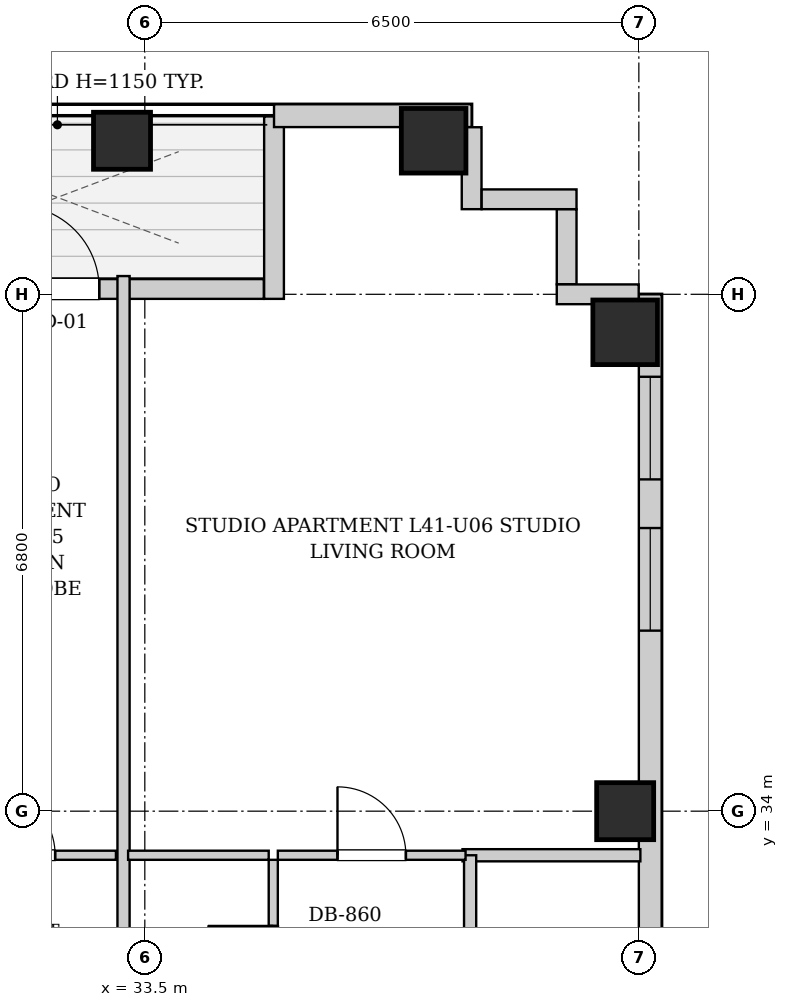
"""IFC4 building model, lengths in metres.
Left out: names, types, materials, properties, quantities, classifications, styles, units other than length and angle.
Written with IfcOpenShell. Run it as: python <this file> out.ifc"""

import sys

from ifc_helpers import new_model, si_unit, direction, frame, frame_2d, origin, origin_2d, place, context, subcontext, project, spatial, rectangle, extrude, element, fill, save


model = new_model("IFC4")
c1 = context("Model", 3, precision=1e-05, world=origin(), true_north=direction((0.0, 1.0)))
c2 = subcontext(c1, "Body", "Model", "MODEL_VIEW")
j1 = project(units=[si_unit("LENGTHUNIT", "METRE"), si_unit("PLANEANGLEUNIT", "RADIAN")], contexts=[c1])
p1 = place(None, origin())
s1 = spatial("IfcSite", under=j1, at=p1, CompositionType="ELEMENT")
p2 = place(p1, origin())
s2 = spatial("IfcBuilding", under=s1, at=p2, CompositionType="ELEMENT")
p3 = place(p2, frame((0.0, 0.0, 143.9)))
s3 = spatial("IfcBuildingStorey", under=s2, at=p3, CompositionType="ELEMENT", Elevation=143.9)
p4 = place(p3, frame((33.2, 42.82, 0.0), z_axis=(0.0, 0.0, 1.0), x_axis=(1.0, 0.0, 0.0)))
e1 = element("IfcColumn", 1, at=p4, inside=s3, PredefinedType="COLUMN", context=c2, shape_type="SweptSolid", body=[
    extrude(rectangle(XDim=0.75, YDim=0.75, at=origin_2d()), origin(), (0.0, 0.0, 1.0), 3.25),
])
p5 = place(p3, frame((37.3, 42.82, 0.0), z_axis=(0.0, 0.0, 1.0), x_axis=(1.0, 0.0, 0.0)))
e2 = element("IfcColumn", 2, at=p5, inside=s3, PredefinedType="COLUMN", context=c2, shape_type="SweptSolid", body=[
    extrude(rectangle(XDim=0.85, YDim=0.85, at=origin_2d()), origin(), (0.0, 0.0, 1.0), 3.25),
])
p6 = place(p3, frame((39.82, 34.0, 0.0), z_axis=(0.0, 0.0, 1.0), x_axis=(1.0, 0.0, 0.0)))
e3 = element("IfcColumn", 3, at=p6, inside=s3, PredefinedType="COLUMN", context=c2, shape_type="SweptSolid", body=[
    extrude(rectangle(XDim=0.75, YDim=0.75, at=origin_2d()), origin(), (0.0, 0.0, 1.0), 3.25),
])
p7 = place(p3, frame((39.82, 40.3, 0.0), z_axis=(0.0, 0.0, 1.0), x_axis=(1.0, 0.0, 0.0)))
e4 = element("IfcColumn", 4, at=p7, inside=s3, PredefinedType="COLUMN", context=c2, shape_type="SweptSolid", body=[
    extrude(rectangle(XDim=0.85, YDim=0.85, at=origin_2d()), origin(), (0.0, 0.0, 1.0), 3.25),
])
p8 = place(p3, frame((29.634, 40.87, 0.0), z_axis=(0.0, 0.0, 1.0), x_axis=(1.0, 0.0, 0.0)))
e5 = element("IfcWall", 5, at=p8, inside=s3, PredefinedType="SOLIDWALL", context=c2, shape_type="SweptSolid", body=[
    extrude(rectangle(XDim=5.432, YDim=0.26, at=frame_2d((2.716, 0.0))), origin(), (0.0, 0.0, 1.0), 2.99),
])
p9 = place(p8, frame((2.166, 0.0, 0.0)))
e6 = element("IfcOpeningElement", 6, at=p9, cuts=e5, PredefinedType="OPENING", context=c2, shape_type="SweptSolid", body=[
    extrude(rectangle(XDim=1.1, YDim=2.0, at=frame_2d((0.55, 1.0))), frame((0.0, 0.14, 0.0), z_axis=(0.0, -1.0, 0.0), x_axis=(1.0, 0.0, 0.0)), (0.0, 0.0, 1.0), 0.28),
])
p10 = place(p8, frame((1.156, 0.0, 0.55)))
e7 = element("IfcOpeningElement", 7, at=p10, cuts=e5, PredefinedType="OPENING", context=c2, shape_type="SweptSolid", body=[
    extrude(rectangle(XDim=0.85, YDim=1.2, at=frame_2d((0.425, 0.6))), frame((0.0, 0.14, 0.0), z_axis=(0.0, -1.0, 0.0), x_axis=(1.0, 0.0, 0.0)), (0.0, 0.0, 1.0), 0.28),
])
p11 = place(p3, frame((35.2, 40.74, 0.0), z_axis=(0.0, 0.0, 1.0), x_axis=(0.0, 1.0, 0.0)))
e8 = element("IfcWall", 8, at=p11, inside=s3, PredefinedType="SOLIDWALL", context=c2, shape_type="SweptSolid", body=[
    extrude(rectangle(XDim=2.4, YDim=0.26, at=frame_2d((1.2, 0.0))), origin(), (0.0, 0.0, 1.0), 2.99),
])
p12 = place(p3, frame((35.2, 43.15, 0.0), z_axis=(0.0, 0.0, 1.0), x_axis=(1.0, 0.0, 0.0)))
e9 = element("IfcWall", 9, at=p12, inside=s3, PredefinedType="SOLIDWALL", context=c2, shape_type="SweptSolid", body=[
    extrude(rectangle(XDim=2.6, YDim=0.3, at=frame_2d((1.3, 0.0))), origin(), (0.0, 0.0, 1.0), 2.99),
])
p13 = place(p3, frame((40.15, 40.8, 0.0), z_axis=(0.0, 0.0, 1.0), x_axis=(0.0, -1.0, 0.0)))
e10 = element("IfcWall", 10, at=p13, inside=s3, PredefinedType="SOLIDWALL", context=c2, shape_type="SweptSolid", body=[
    extrude(rectangle(XDim=34.5, YDim=0.3, at=frame_2d((17.25, 0.0))), origin(), (0.0, 0.0, 1.0), 2.99),
])
p14 = place(p13, frame((31.575, 0.0, 0.55)))
e11 = element("IfcOpeningElement", 11, at=p14, cuts=e10, PredefinedType="OPENING", context=c2, shape_type="SweptSolid", body=[
    extrude(rectangle(XDim=1.35, YDim=1.2, at=frame_2d((0.675, 0.6))), frame((0.0, 0.16, 0.0), z_axis=(0.0, -1.0, 0.0), x_axis=(1.0, 0.0, 0.0)), (0.0, 0.0, 1.0), 0.32),
])
p15 = place(p13, frame((3.075, 0.0, 0.55)))
e12 = element("IfcOpeningElement", 12, at=p15, cuts=e10, PredefinedType="OPENING", context=c2, shape_type="SweptSolid", body=[
    extrude(rectangle(XDim=1.35, YDim=1.2, at=frame_2d((0.675, 0.6))), frame((0.0, 0.16, 0.0), z_axis=(0.0, -1.0, 0.0), x_axis=(1.0, 0.0, 0.0)), (0.0, 0.0, 1.0), 0.32),
])
p16 = place(p13, frame((1.085, 0.0, 0.55)))
e13 = element("IfcOpeningElement", 13, at=p16, cuts=e10, PredefinedType="OPENING", context=c2, shape_type="SweptSolid", body=[
    extrude(rectangle(XDim=1.35, YDim=1.2, at=frame_2d((0.675, 0.6))), frame((0.0, 0.16, 0.0), z_axis=(0.0, -1.0, 0.0), x_axis=(1.0, 0.0, 0.0)), (0.0, 0.0, 1.0), 0.32),
])
p17 = place(p13, frame((22.8, 0.0, 0.55)))
e14 = element("IfcOpeningElement", 14, at=p17, cuts=e10, PredefinedType="OPENING", context=c2, shape_type="SweptSolid", body=[
    extrude(rectangle(XDim=1.35, YDim=1.2, at=frame_2d((0.675, 0.6))), frame((0.0, 0.16, 0.0), z_axis=(0.0, -1.0, 0.0), x_axis=(1.0, 0.0, 0.0)), (0.0, 0.0, 1.0), 0.32),
])
p18 = place(p13, frame((13.425, 0.0, 0.55)))
e15 = element("IfcOpeningElement", 15, at=p18, cuts=e10, PredefinedType="OPENING", context=c2, shape_type="SweptSolid", body=[
    extrude(rectangle(XDim=1.35, YDim=1.2, at=frame_2d((0.675, 0.6))), frame((0.0, 0.16, 0.0), z_axis=(0.0, -1.0, 0.0), x_axis=(1.0, 0.0, 0.0)), (0.0, 0.0, 1.0), 0.32),
])
p19 = place(p3, frame((37.8, 42.998, 0.0), z_axis=(0.0, 0.0, 1.0), x_axis=(0.0, -1.0, 0.0)))
e16 = element("IfcWall", 16, at=p19, inside=s3, PredefinedType="SOLIDWALL", context=c2, shape_type="SweptSolid", body=[
    extrude(rectangle(XDim=1.078, YDim=0.26, at=frame_2d((0.539, 0.0))), origin(), (0.0, 0.0, 1.0), 2.99),
])
p20 = place(p3, frame((37.932, 42.05, 0.0), z_axis=(0.0, 0.0, 1.0), x_axis=(1.0, 0.0, 0.0)))
e17 = element("IfcWall", 17, at=p20, inside=s3, PredefinedType="SOLIDWALL", context=c2, shape_type="SweptSolid", body=[
    extrude(rectangle(XDim=1.248, YDim=0.26, at=frame_2d((0.624, 0.0))), origin(), (0.0, 0.0, 1.0), 2.99),
])
p21 = place(p3, frame((39.05, 41.918, 0.0), z_axis=(0.0, 0.0, 1.0), x_axis=(0.0, -1.0, 0.0)))
e18 = element("IfcWall", 18, at=p21, inside=s3, PredefinedType="SOLIDWALL", context=c2, shape_type="SweptSolid", body=[
    extrude(rectangle(XDim=0.986, YDim=0.26, at=frame_2d((0.493, 0.0))), origin(), (0.0, 0.0, 1.0), 2.99),
])
p22 = place(p3, frame((38.92, 40.8, 0.0), z_axis=(0.0, 0.0, 1.0), x_axis=(1.0, 0.0, 0.0)))
e19 = element("IfcWall", 19, at=p22, inside=s3, PredefinedType="SOLIDWALL", context=c2, shape_type="SweptSolid", body=[
    extrude(rectangle(XDim=1.078, YDim=0.26, at=frame_2d((0.539, 0.0))), origin(), (0.0, 0.0, 1.0), 2.99),
])
p23 = place(p3, frame((30.62, 33.42, 0.0), z_axis=(0.0, 0.0, 1.0), x_axis=(1.0, 0.0, 0.0)))
e20 = element("IfcWall", 20, at=p23, inside=s3, PredefinedType="PARTITIONING", context=c2, shape_type="SweptSolid", body=[
    extrude(rectangle(XDim=2.5, YDim=0.12, at=frame_2d((1.25, 0.0))), origin(), (0.0, 0.0, 1.0), 2.99),
])
p24 = place(p23, frame((0.8, 0.0, 0.0)))
e21 = element("IfcOpeningElement", 21, at=p24, cuts=e20, PredefinedType="OPENING", context=c2, shape_type="SweptSolid", body=[
    extrude(rectangle(XDim=0.9, YDim=2.05, at=frame_2d((0.45, 1.025))), frame((0.0, 0.07, 0.0), z_axis=(0.0, -1.0, 0.0), x_axis=(1.0, 0.0, 0.0)), (0.0, 0.0, 1.0), 0.14),
])
p25 = place(p3, frame((37.68, 33.42, 0.0), z_axis=(0.0, 0.0, 1.0), x_axis=(1.0, 0.0, 0.0)))
e22 = element("IfcWall", 22, at=p25, inside=s3, PredefinedType="PARTITIONING", context=c2, shape_type="SweptSolid", body=[
    extrude(rectangle(XDim=2.34, YDim=0.16, at=frame_2d((1.17, 0.0))), origin(), (0.0, 0.0, 1.0), 2.99),
])
p26 = place(p3, frame((37.78, 30.76, 0.0), z_axis=(0.0, 0.0, 1.0), x_axis=(0.0, 1.0, 0.0)))
e23 = element("IfcWall", 23, at=p26, inside=s3, PredefinedType="PARTITIONING", context=c2, shape_type="SweptSolid", body=[
    extrude(rectangle(XDim=2.66, YDim=0.16, at=frame_2d((1.33, 0.0))), origin(), (0.0, 0.0, 1.0), 2.99),
])
p27 = place(p3, frame((33.22, 30.76, 0.0), z_axis=(0.0, 0.0, 1.0), x_axis=(0.0, 1.0, 0.0)))
e24 = element("IfcWall", 24, at=p27, inside=s3, PredefinedType="PARTITIONING", context=c2, shape_type="SweptSolid", body=[
    extrude(rectangle(XDim=10.28, YDim=0.16, at=frame_2d((5.14, 0.0))), origin(), (0.0, 0.0, 1.0), 2.426),
])
p28 = place(p3, frame((35.19, 30.76, 0.0), z_axis=(0.0, 0.0, 1.0), x_axis=(0.0, 1.0, 0.0)))
e25 = element("IfcWall", 25, at=p28, inside=s3, PredefinedType="PARTITIONING", context=c2, shape_type="SweptSolid", body=[
    extrude(rectangle(XDim=2.6, YDim=0.12, at=frame_2d((1.3, 0.0))), origin(), (0.0, 0.0, 1.0), 2.99),
])
p29 = place(p28, frame((0.87, 0.0, 0.0)))
e26 = element("IfcOpeningElement", 26, at=p29, cuts=e25, PredefinedType="OPENING", context=c2, shape_type="SweptSolid", body=[
    extrude(rectangle(XDim=0.86, YDim=2.05, at=frame_2d((0.43, 1.025))), frame((0.0, 0.07, 0.0), z_axis=(0.0, -1.0, 0.0), x_axis=(1.0, 0.0, 0.0)), (0.0, 0.0, 1.0), 0.14),
])
p30 = place(p3, frame((33.28, 33.42, 0.0), z_axis=(0.0, 0.0, 1.0), x_axis=(1.0, 0.0, 0.0)))
e27 = element("IfcWall", 27, at=p30, inside=s3, PredefinedType="PARTITIONING", context=c2, shape_type="SweptSolid", body=[
    extrude(rectangle(XDim=1.85, YDim=0.12, at=frame_2d((0.925, 0.0))), origin(), (0.0, 0.0, 1.0), 2.99),
])
p31 = place(p3, frame((35.25, 33.42, 0.0), z_axis=(0.0, 0.0, 1.0), x_axis=(1.0, 0.0, 0.0)))
e28 = element("IfcWall", 28, at=p31, inside=s3, PredefinedType="PARTITIONING", context=c2, shape_type="SweptSolid", body=[
    extrude(rectangle(XDim=2.47, YDim=0.12, at=frame_2d((1.235, 0.0))), origin(), (0.0, 0.0, 1.0), 2.99),
])
p32 = place(p31, frame((0.785, 0.0, 0.0)))
e29 = element("IfcOpeningElement", 29, at=p32, cuts=e28, PredefinedType="OPENING", context=c2, shape_type="SweptSolid", body=[
    extrude(rectangle(XDim=0.9, YDim=2.05, at=frame_2d((0.45, 1.025))), frame((0.0, 0.07, 0.0), z_axis=(0.0, -1.0, 0.0), x_axis=(1.0, 0.0, 0.0)), (0.0, 0.0, 1.0), 0.14),
])
p33 = place(p24, origin())
e30 = element("IfcDoor", 30, at=p33, inside=s3, OperationType="SINGLE_SWING_LEFT", PredefinedType="DOOR", context=c2, shape_type="SweptSolid", body=[
    extrude(rectangle(XDim=0.9, YDim=2.05, at=frame_2d((0.45, 1.025))), frame((0.0, 0.025, 0.0), z_axis=(0.0, -1.0, 0.0), x_axis=(1.0, 0.0, 0.0)), (0.0, 0.0, 1.0), 0.05),
])
fill(e21, e30)
p34 = place(p29, origin())
e31 = element("IfcDoor", 31, at=p34, inside=s3, OperationType="SINGLE_SWING_RIGHT", PredefinedType="DOOR", context=c2, shape_type="SweptSolid", body=[
    extrude(rectangle(XDim=0.86, YDim=2.05, at=frame_2d((0.43, 1.025))), frame((0.0, 0.025, 0.0), z_axis=(0.0, -1.0, 0.0), x_axis=(1.0, 0.0, 0.0)), (0.0, 0.0, 1.0), 0.05),
])
fill(e26, e31)
p35 = place(p32, origin())
e32 = element("IfcDoor", 32, at=p35, inside=s3, OperationType="SINGLE_SWING_LEFT", PredefinedType="DOOR", context=c2, shape_type="SweptSolid", body=[
    extrude(rectangle(XDim=0.9, YDim=2.05, at=frame_2d((0.45, 1.025))), frame((0.0, 0.025, 0.0), z_axis=(0.0, -1.0, 0.0), x_axis=(1.0, 0.0, 0.0)), (0.0, 0.0, 1.0), 0.05),
])
fill(e29, e32)
p36 = place(p9, origin())
e33 = element("IfcDoor", 33, at=p36, inside=s3, OperationType="SINGLE_SWING_LEFT", PredefinedType="DOOR", context=c2, shape_type="SweptSolid", body=[
    extrude(rectangle(XDim=1.1, YDim=2.0, at=frame_2d((0.55, 1.0))), frame((0.0, 0.025, 0.0), z_axis=(0.0, -1.0, 0.0), x_axis=(1.0, 0.0, 0.0)), (0.0, 0.0, 1.0), 0.05),
])
fill(e6, e33)
p37 = place(p15, origin())
e34 = element("IfcWindow", 34, at=p37, inside=s3, PartitioningType="SINGLE_PANEL", PredefinedType="WINDOW", context=c2, shape_type="SweptSolid", body=[
    extrude(rectangle(XDim=1.35, YDim=1.2, at=frame_2d((0.675, 0.6))), frame((0.0, 0.03, 0.0), z_axis=(0.0, -1.0, 0.0), x_axis=(1.0, 0.0, 0.0)), (0.0, 0.0, 1.0), 0.06),
])
fill(e12, e34)
p38 = place(p16, origin())
e35 = element("IfcWindow", 35, at=p38, inside=s3, PartitioningType="SINGLE_PANEL", PredefinedType="WINDOW", context=c2, shape_type="SweptSolid", body=[
    extrude(rectangle(XDim=1.35, YDim=1.2, at=frame_2d((0.675, 0.6))), frame((0.0, 0.03, 0.0), z_axis=(0.0, -1.0, 0.0), x_axis=(1.0, 0.0, 0.0)), (0.0, 0.0, 1.0), 0.06),
])
fill(e13, e35)
save(model, sys.argv[1])
